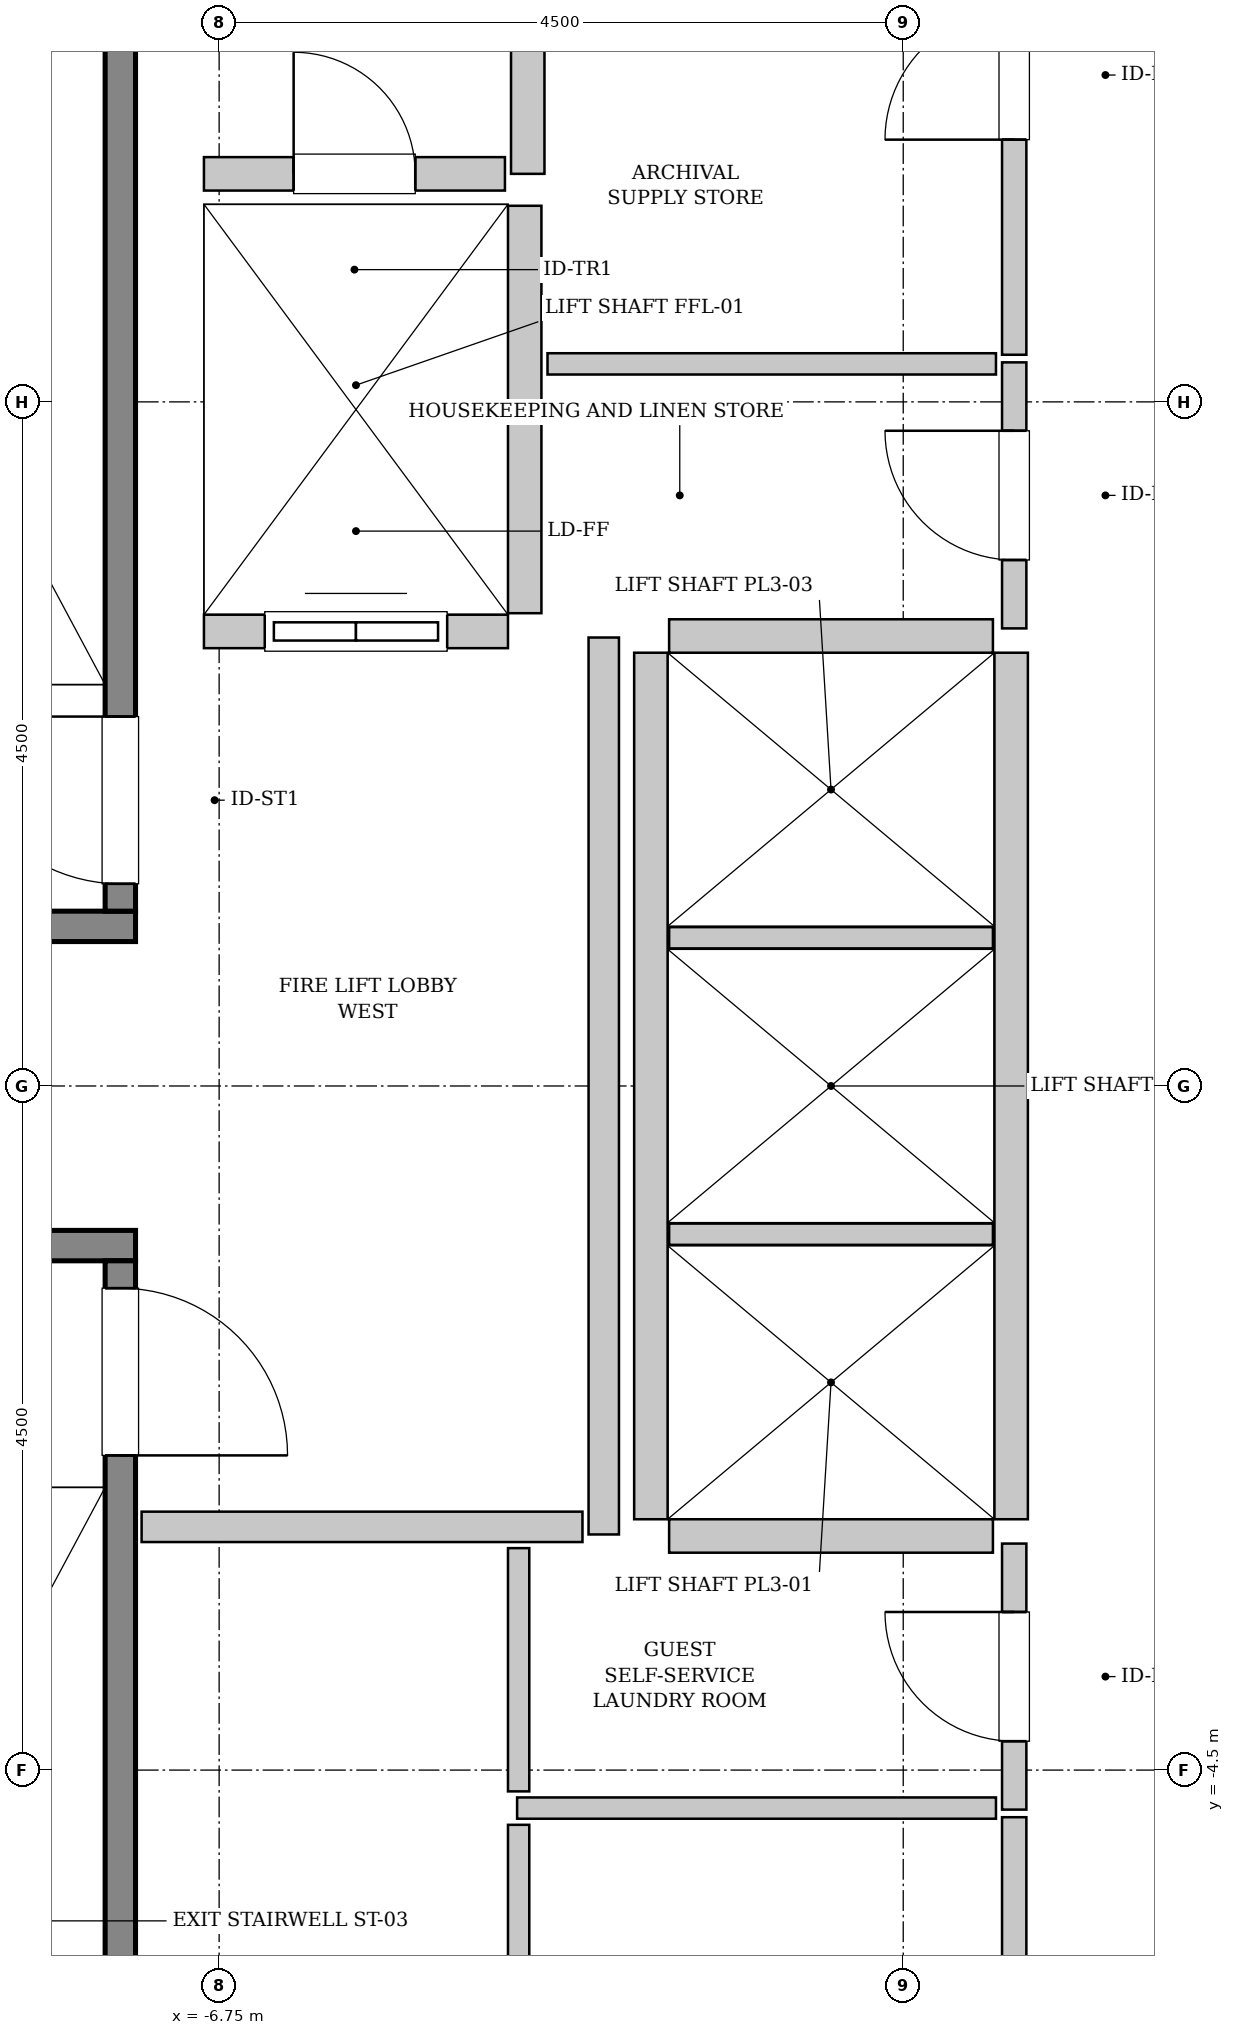
"""IFC4 building model, lengths in metres.
Left out: names, types, materials, properties, quantities, classifications, styles, units other than length and angle.
Written with IfcOpenShell. Run it as: python <this file> out.ifc"""

import sys

from ifc_helpers import new_model, si_unit, direction, frame, frame_2d, origin, place, context, subcontext, project, spatial, rectangle, extrude, source, transform, mapped, element, fill, save


model = new_model("IFC4")
c1 = context("Model", 3, precision=1e-05, world=origin(), true_north=direction((0.0, 1.0)))
c2 = subcontext(c1, "Body", "Model", "MODEL_VIEW")
j1 = project(units=[si_unit("LENGTHUNIT", "METRE"), si_unit("PLANEANGLEUNIT", "RADIAN")], contexts=[c1])
p1 = place(None, origin())
s1 = spatial("IfcSite", under=j1, at=p1, CompositionType="ELEMENT")
p2 = place(p1, origin())
s2 = spatial("IfcBuilding", under=s1, at=p2, CompositionType="ELEMENT")
p3 = place(p2, frame((0.0, 0.0, 349.0)))
s3 = spatial("IfcBuildingStorey", under=s2, at=p3, CompositionType="ELEMENT", Elevation=349.0)
m1 = source(origin(), c2, "Body", "SweptSolid", [
    extrude(rectangle(XDim=3.4, YDim=0.2, at=frame_2d((1.7, 0.0))), origin(), (0.0, 0.0, 1.0), 4.8),
])
p4 = place(p3, frame((-7.3, 1.05, 0.0), z_axis=(0.0, 0.0, 1.0), x_axis=(-1.0, 0.0, 0.0)))
e1 = element("IfcWall", 1, at=p4, inside=s3, PredefinedType="SOLIDWALL", context=c2, shape_type="MappedRepresentation", body=[
    mapped(m1, transform((0.0, 0.0, 0.0), x_axis=(1.0, 0.0, 0.0), y_axis=(0.0, 1.0, 0.0), z_axis=(0.0, 0.0, 1.0), scale=1.0)),
])
m2 = source(origin(), c2, "Body", "SweptSolid", [
    extrude(rectangle(XDim=7.1, YDim=0.2, at=frame_2d((3.55, 0.0))), origin(), (0.0, 0.0, 1.0), 4.8),
])
p5 = place(p3, frame((-7.4, 1.15, 0.0), z_axis=(0.0, 0.0, 1.0), x_axis=(0.0, 1.0, 0.0)))
e2 = element("IfcWall", 2, at=p5, inside=s3, PredefinedType="SOLIDWALL", context=c2, shape_type="MappedRepresentation", body=[
    mapped(m2, transform((0.0, 0.0, 0.0), x_axis=(1.0, 0.0, 0.0), y_axis=(0.0, 1.0, 0.0), z_axis=(0.0, 0.0, 1.0), scale=1.0)),
])
p6 = place(p5, frame((0.18, 0.0, 0.0)))
e3 = element("IfcOpeningElement", 3, at=p6, cuts=e2, PredefinedType="OPENING", context=c2, shape_type="SweptSolid", body=[
    extrude(rectangle(XDim=1.1, YDim=2.15, at=frame_2d((0.55, 1.075))), frame((0.0, 0.11, 0.0), z_axis=(0.0, -1.0, 0.0), x_axis=(1.0, 0.0, 0.0)), (0.0, 0.0, 1.0), 0.22),
])
p7 = place(p3, frame((-10.7, -1.05, 0.0), z_axis=(0.0, 0.0, 1.0), x_axis=(1.0, 0.0, 0.0)))
e4 = element("IfcWall", 4, at=p7, inside=s3, PredefinedType="SOLIDWALL", context=c2, shape_type="MappedRepresentation", body=[
    mapped(m1, transform((0.0, 0.0, 0.0), x_axis=(1.0, 0.0, 0.0), y_axis=(0.0, 1.0, 0.0), z_axis=(0.0, 0.0, 1.0), scale=1.0)),
])
p8 = place(p3, frame((-7.4, -1.15, 0.0), z_axis=(0.0, 0.0, 1.0), x_axis=(0.0, -1.0, 0.0)))
e5 = element("IfcWall", 5, at=p8, inside=s3, PredefinedType="SOLIDWALL", context=c2, shape_type="MappedRepresentation", body=[
    mapped(m2, transform((0.0, 0.0, 0.0), x_axis=(1.0, 0.0, 0.0), y_axis=(0.0, 1.0, 0.0), z_axis=(0.0, 0.0, 1.0), scale=1.0)),
])
p9 = place(p8, frame((0.18, 0.0, 0.0)))
e6 = element("IfcOpeningElement", 6, at=p9, cuts=e5, PredefinedType="OPENING", context=c2, shape_type="SweptSolid", body=[
    extrude(rectangle(XDim=1.1, YDim=2.15, at=frame_2d((0.55, 1.075))), frame((0.0, 0.11, 0.0), z_axis=(0.0, -1.0, 0.0), x_axis=(1.0, 0.0, 0.0)), (0.0, 0.0, 1.0), 0.22),
])
m3 = source(origin(), c2, "Body", "SweptSolid", [
    extrude(rectangle(XDim=2.0, YDim=0.22, at=frame_2d((1.0, 0.0))), origin(), (0.0, 0.0, 1.0), 4.485),
])
p10 = place(p3, frame((-6.85, 2.99, 0.0), z_axis=(0.0, 0.0, 1.0), x_axis=(1.0, 0.0, 0.0)))
e7 = element("IfcWall", 7, at=p10, inside=s3, PredefinedType="SOLIDWALL", context=c2, shape_type="MappedRepresentation", body=[
    mapped(m3, transform((0.0, 0.0, 0.0), x_axis=(1.0, 0.0, 0.0), y_axis=(0.0, 1.0, 0.0), z_axis=(0.0, 0.0, 1.0), scale=1.0)),
])
p11 = place(p10, frame((0.4, 0.0, 0.0)))
e8 = element("IfcOpeningElement", 8, at=p11, cuts=e7, PredefinedType="OPENING", context=c2, shape_type="SweptSolid", body=[
    extrude(rectangle(XDim=1.2, YDim=2.2, at=frame_2d((0.6, 1.1))), frame((0.0, 0.12, 0.0), z_axis=(0.0, -1.0, 0.0), x_axis=(1.0, 0.0, 0.0)), (0.0, 0.0, 1.0), 0.24),
])
m4 = source(origin(), c2, "Body", "SweptSolid", [
    extrude(rectangle(XDim=2.68, YDim=0.22, at=frame_2d((1.34, 0.0))), origin(), (0.0, 0.0, 1.0), 4.485),
])
p12 = place(p3, frame((-4.74, 3.11, 0.0), z_axis=(0.0, 0.0, 1.0), x_axis=(0.0, 1.0, 0.0)))
e9 = element("IfcWall", 9, at=p12, inside=s3, PredefinedType="SOLIDWALL", context=c2, shape_type="MappedRepresentation", body=[
    mapped(m4, transform((0.0, 0.0, 0.0), x_axis=(1.0, 0.0, 0.0), y_axis=(0.0, 1.0, 0.0), z_axis=(0.0, 0.0, 1.0), scale=1.0)),
])
m5 = source(origin(), c2, "Body", "SweptSolid", [
    extrude(rectangle(XDim=5.7, YDim=0.22, at=frame_2d((2.85, 0.0))), origin(), (0.0, 0.0, 1.0), 4.485),
])
for number, where, z_axis, x_axis in (
    (10, (-1.54, -2.85, 0.0), (0.0, 0.0, 1.0), (0.0, 1.0, 0.0)),
    (11, (-3.91, 2.85, 0.0), (0.0, 0.0, 1.0), (0.0, -1.0, 0.0)),
):
    element("IfcWall", number, at=place(p3, frame(where, z_axis=z_axis, x_axis=x_axis)), inside=s3, PredefinedType="SOLIDWALL", context=c2, shape_type="MappedRepresentation", body=[
        mapped(m5, transform((0.0, 0.0, 0.0), x_axis=(1.0, 0.0, 0.0), y_axis=(0.0, 1.0, 0.0), z_axis=(0.0, 0.0, 1.0), scale=1.0)),
    ])
m6 = source(origin(), c2, "Body", "SweptSolid", [
    extrude(rectangle(XDim=2.13, YDim=0.22, at=frame_2d((1.065, 0.0))), origin(), (0.0, 0.0, 1.0), 4.485),
])
p13 = place(p3, frame((-3.79, -2.96, 0.0), z_axis=(0.0, 0.0, 1.0), x_axis=(1.0, 0.0, 0.0)))
e12 = element("IfcWall", 12, at=p13, inside=s3, PredefinedType="SOLIDWALL", context=c2, shape_type="MappedRepresentation", body=[
    mapped(m6, transform((0.0, 0.0, 0.0), x_axis=(1.0, 0.0, 0.0), y_axis=(0.0, 1.0, 0.0), z_axis=(0.0, 0.0, 1.0), scale=1.0)),
])
m7 = source(origin(), c2, "Body", "SweptSolid", [
    extrude(rectangle(XDim=2.13, YDim=0.14, at=frame_2d((1.065, 0.0))), origin(), (0.0, 0.0, 1.0), 4.485),
])
for number, where, z_axis, x_axis in (
    (13, (-3.79, -0.975, 0.0), (0.0, 0.0, 1.0), (1.0, 0.0, 0.0)),
    (14, (-3.79, 0.975, 0.0), (0.0, 0.0, 1.0), (1.0, 0.0, 0.0)),
):
    element("IfcWall", number, at=place(p3, frame(where, z_axis=z_axis, x_axis=x_axis)), inside=s3, PredefinedType="PARTITIONING", context=c2, shape_type="MappedRepresentation", body=[
        mapped(m7, transform((0.0, 0.0, 0.0), x_axis=(1.0, 0.0, 0.0), y_axis=(0.0, 1.0, 0.0), z_axis=(0.0, 0.0, 1.0), scale=1.0)),
    ])
p14 = place(p3, frame((-1.66, 2.96, 0.0), z_axis=(0.0, 0.0, 1.0), x_axis=(-1.0, 0.0, 0.0)))
e15 = element("IfcWall", 15, at=p14, inside=s3, PredefinedType="SOLIDWALL", context=c2, shape_type="MappedRepresentation", body=[
    mapped(m6, transform((0.0, 0.0, 0.0), x_axis=(1.0, 0.0, 0.0), y_axis=(0.0, 1.0, 0.0), z_axis=(0.0, 0.0, 1.0), scale=1.0)),
])
m8 = source(origin(), c2, "Body", "SweptSolid", [
    extrude(rectangle(XDim=2.25, YDim=0.22, at=frame_2d((1.125, 0.0))), origin(), (0.0, 0.0, 1.0), 4.485),
])
p15 = place(p3, frame((-4.72, 6.0, 0.0), z_axis=(0.0, 0.0, 1.0), x_axis=(0.0, 1.0, 0.0)))
e16 = element("IfcWall", 16, at=p15, inside=s3, PredefinedType="SOLIDWALL", context=c2, shape_type="MappedRepresentation", body=[
    mapped(m8, transform((0.0, 0.0, 0.0), x_axis=(1.0, 0.0, 0.0), y_axis=(0.0, 1.0, 0.0), z_axis=(0.0, 0.0, 1.0), scale=1.0)),
])
m9 = source(origin(), c2, "Body", "SweptSolid", [
    extrude(rectangle(XDim=1.98, YDim=0.22, at=frame_2d((0.99, 0.0))), origin(), (0.0, 0.0, 1.0), 4.485),
])
p16 = place(p3, frame((-6.85, 6.0, 0.0), z_axis=(0.0, 0.0, 1.0), x_axis=(1.0, 0.0, 0.0)))
e17 = element("IfcWall", 17, at=p16, inside=s3, PredefinedType="SOLIDWALL", context=c2, shape_type="MappedRepresentation", body=[
    mapped(m9, transform((0.0, 0.0, 0.0), x_axis=(1.0, 0.0, 0.0), y_axis=(0.0, 1.0, 0.0), z_axis=(0.0, 0.0, 1.0), scale=1.0)),
])
p17 = place(p16, frame((0.59, 0.0, 0.0)))
e18 = element("IfcOpeningElement", 18, at=p17, cuts=e17, PredefinedType="OPENING", context=c2, shape_type="SweptSolid", body=[
    extrude(rectangle(XDim=0.8, YDim=2.0, at=frame_2d((0.4, 1.0))), frame((0.0, 0.12, 0.0), z_axis=(0.0, -1.0, 0.0), x_axis=(1.0, 0.0, 0.0)), (0.0, 0.0, 1.0), 0.24),
])
m10 = source(origin(), c2, "Body", "SweptSolid", [
    extrude(rectangle(XDim=5.9, YDim=0.2, at=frame_2d((2.95, 0.0))), origin(), (0.0, 0.0, 1.0), 4.485),
])
p18 = place(p3, frame((-4.22, -2.95, 0.0), z_axis=(0.0, 0.0, 1.0), x_axis=(0.0, 1.0, 0.0)))
e19 = element("IfcWall", 19, at=p18, inside=s3, PredefinedType="PARTITIONING", context=c2, shape_type="MappedRepresentation", body=[
    mapped(m10, transform((0.0, 0.0, 0.0), x_axis=(1.0, 0.0, 0.0), y_axis=(0.0, 1.0, 0.0), z_axis=(0.0, 0.0, 1.0), scale=1.0)),
])
m11 = source(origin(), c2, "Body", "SweptSolid", [
    extrude(rectangle(XDim=2.9, YDim=0.2, at=frame_2d((1.45, 0.0))), origin(), (0.0, 0.0, 1.0), 4.485),
])
p19 = place(p3, frame((-7.26, -2.9, 0.0), z_axis=(0.0, 0.0, 1.0), x_axis=(1.0, 0.0, 0.0)))
e20 = element("IfcWall", 20, at=p19, inside=s3, PredefinedType="PARTITIONING", context=c2, shape_type="MappedRepresentation", body=[
    mapped(m11, transform((0.0, 0.0, 0.0), x_axis=(1.0, 0.0, 0.0), y_axis=(0.0, 1.0, 0.0), z_axis=(0.0, 0.0, 1.0), scale=1.0)),
])
m12 = source(origin(), c2, "Body", "SweptSolid", [
    extrude(rectangle(XDim=1.75, YDim=0.16, at=frame_2d((0.875, 0.0))), origin(), (0.0, 0.0, 1.0), 4.485),
])
p20 = place(p3, frame((-1.52, 3.01, 0.0), z_axis=(0.0, 0.0, 1.0), x_axis=(0.0, 1.0, 0.0)))
e21 = element("IfcWall", 21, at=p20, inside=s3, PredefinedType="PARTITIONING", context=c2, shape_type="MappedRepresentation", body=[
    mapped(m12, transform((0.0, 0.0, 0.0), x_axis=(1.0, 0.0, 0.0), y_axis=(0.0, 1.0, 0.0), z_axis=(0.0, 0.0, 1.0), scale=1.0)),
])
p21 = place(p20, frame((0.45, 0.0, 0.0)))
e22 = element("IfcOpeningElement", 22, at=p21, cuts=e21, PredefinedType="OPENING", context=c2, shape_type="SweptSolid", body=[
    extrude(rectangle(XDim=0.85, YDim=2.1, at=frame_2d((0.425, 1.05))), frame((0.0, 0.09, 0.0), z_axis=(0.0, -1.0, 0.0), x_axis=(1.0, 0.0, 0.0)), (0.0, 0.0, 1.0), 0.18),
])
m13 = source(origin(), c2, "Body", "SweptSolid", [
    extrude(rectangle(XDim=2.95, YDim=0.14, at=frame_2d((1.475, 0.0))), origin(), (0.0, 0.0, 1.0), 4.485),
])
p22 = place(p3, frame((-4.59, 4.75, 0.0), z_axis=(0.0, 0.0, 1.0), x_axis=(1.0, 0.0, 0.0)))
e23 = element("IfcWall", 23, at=p22, inside=s3, PredefinedType="PARTITIONING", context=c2, shape_type="MappedRepresentation", body=[
    mapped(m13, transform((0.0, 0.0, 0.0), x_axis=(1.0, 0.0, 0.0), y_axis=(0.0, 1.0, 0.0), z_axis=(0.0, 0.0, 1.0), scale=1.0)),
])
m14 = source(origin(), c2, "Body", "SweptSolid", [
    extrude(rectangle(XDim=3.68, YDim=0.16, at=frame_2d((1.84, 0.0))), origin(), (0.0, 0.0, 1.0), 4.485),
])
p23 = place(p3, frame((-1.52, 4.81, 0.0), z_axis=(0.0, 0.0, 1.0), x_axis=(0.0, 1.0, 0.0)))
e24 = element("IfcWall", 24, at=p23, inside=s3, PredefinedType="PARTITIONING", context=c2, shape_type="MappedRepresentation", body=[
    mapped(m14, transform((0.0, 0.0, 0.0), x_axis=(1.0, 0.0, 0.0), y_axis=(0.0, 1.0, 0.0), z_axis=(0.0, 0.0, 1.0), scale=1.0)),
])
p24 = place(p23, frame((1.415, 0.0, 0.0)))
e25 = element("IfcOpeningElement", 25, at=p24, cuts=e24, PredefinedType="OPENING", context=c2, shape_type="SweptSolid", body=[
    extrude(rectangle(XDim=0.85, YDim=2.1, at=frame_2d((0.425, 1.05))), frame((0.0, 0.09, 0.0), z_axis=(0.0, -1.0, 0.0), x_axis=(1.0, 0.0, 0.0)), (0.0, 0.0, 1.0), 0.18),
])
p25 = place(p3, frame((-1.52, -4.76, 0.0), z_axis=(0.0, 0.0, 1.0), x_axis=(0.0, 1.0, 0.0)))
e26 = element("IfcWall", 26, at=p25, inside=s3, PredefinedType="PARTITIONING", context=c2, shape_type="MappedRepresentation", body=[
    mapped(m12, transform((0.0, 0.0, 0.0), x_axis=(1.0, 0.0, 0.0), y_axis=(0.0, 1.0, 0.0), z_axis=(0.0, 0.0, 1.0), scale=1.0)),
])
p26 = place(p25, frame((0.45, 0.0, 0.0)))
e27 = element("IfcOpeningElement", 27, at=p26, cuts=e26, PredefinedType="OPENING", context=c2, shape_type="SweptSolid", body=[
    extrude(rectangle(XDim=0.85, YDim=2.1, at=frame_2d((0.425, 1.05))), frame((0.0, 0.09, 0.0), z_axis=(0.0, -1.0, 0.0), x_axis=(1.0, 0.0, 0.0)), (0.0, 0.0, 1.0), 0.18),
])
m15 = source(origin(), c2, "Body", "SweptSolid", [
    extrude(rectangle(XDim=3.15, YDim=0.14, at=frame_2d((1.575, 0.0))), origin(), (0.0, 0.0, 1.0), 4.485),
])
p27 = place(p3, frame((-4.79, -4.75, 0.0), z_axis=(0.0, 0.0, 1.0), x_axis=(1.0, 0.0, 0.0)))
e28 = element("IfcWall", 28, at=p27, inside=s3, PredefinedType="PARTITIONING", context=c2, shape_type="MappedRepresentation", body=[
    mapped(m15, transform((0.0, 0.0, 0.0), x_axis=(1.0, 0.0, 0.0), y_axis=(0.0, 1.0, 0.0), z_axis=(0.0, 0.0, 1.0), scale=1.0)),
])
m16 = source(origin(), c2, "Body", "SweptSolid", [
    extrude(rectangle(XDim=1.6, YDim=0.14, at=frame_2d((0.8, 0.0))), origin(), (0.0, 0.0, 1.0), 4.485),
])
p28 = place(p3, frame((-4.78, -4.64, 0.0), z_axis=(0.0, 0.0, 1.0), x_axis=(0.0, 1.0, 0.0)))
e29 = element("IfcWall", 29, at=p28, inside=s3, PredefinedType="PARTITIONING", context=c2, shape_type="MappedRepresentation", body=[
    mapped(m16, transform((0.0, 0.0, 0.0), x_axis=(1.0, 0.0, 0.0), y_axis=(0.0, 1.0, 0.0), z_axis=(0.0, 0.0, 1.0), scale=1.0)),
])
p29 = place(p3, frame((-1.52, -8.49, 0.0), z_axis=(0.0, 0.0, 1.0), x_axis=(0.0, 1.0, 0.0)))
e30 = element("IfcWall", 30, at=p29, inside=s3, PredefinedType="PARTITIONING", context=c2, shape_type="MappedRepresentation", body=[
    mapped(m14, transform((0.0, 0.0, 0.0), x_axis=(1.0, 0.0, 0.0), y_axis=(0.0, 1.0, 0.0), z_axis=(0.0, 0.0, 1.0), scale=1.0)),
])
p30 = place(p29, frame((1.415, 0.0, 0.0)))
e31 = element("IfcOpeningElement", 31, at=p30, cuts=e30, PredefinedType="OPENING", context=c2, shape_type="SweptSolid", body=[
    extrude(rectangle(XDim=0.85, YDim=2.1, at=frame_2d((0.425, 1.05))), frame((0.0, 0.09, 0.0), z_axis=(0.0, -1.0, 0.0), x_axis=(1.0, 0.0, 0.0)), (0.0, 0.0, 1.0), 0.18),
])
m17 = source(origin(), c2, "Body", "SweptSolid", [
    extrude(rectangle(XDim=3.63, YDim=0.14, at=frame_2d((1.815, 0.0))), origin(), (0.0, 0.0, 1.0), 4.485),
])
p31 = place(p3, frame((-4.78, -8.49, 0.0), z_axis=(0.0, 0.0, 1.0), x_axis=(0.0, 1.0, 0.0)))
e32 = element("IfcWall", 32, at=p31, inside=s3, PredefinedType="PARTITIONING", context=c2, shape_type="MappedRepresentation", body=[
    mapped(m17, transform((0.0, 0.0, 0.0), x_axis=(1.0, 0.0, 0.0), y_axis=(0.0, 1.0, 0.0), z_axis=(0.0, 0.0, 1.0), scale=1.0)),
])
m18 = source(origin(), c2, "Body", "SweptSolid", [
    extrude(rectangle(XDim=1.1, YDim=2.15, at=frame_2d((0.55, 1.075))), frame((0.0, 0.025, 0.0), z_axis=(0.0, -1.0, 0.0), x_axis=(1.0, 0.0, 0.0)), (0.0, 0.0, 1.0), 0.05),
])
p32 = place(p6, origin())
e33 = element("IfcDoor", 33, at=p32, inside=s3, OperationType="SINGLE_SWING_RIGHT", PredefinedType="DOOR", context=c2, shape_type="MappedRepresentation", body=[
    mapped(m18, transform((0.0, 0.0, 0.0), x_axis=(1.0, 0.0, 0.0), y_axis=(0.0, 1.0, 0.0), z_axis=(0.0, 0.0, 1.0), scale=1.0)),
])
fill(e3, e33)
p33 = place(p9, origin())
e34 = element("IfcDoor", 34, at=p33, inside=s3, OperationType="SINGLE_SWING_RIGHT", PredefinedType="DOOR", context=c2, shape_type="MappedRepresentation", body=[
    mapped(m18, transform((0.0, 0.0, 0.0), x_axis=(1.0, 0.0, 0.0), y_axis=(0.0, 1.0, 0.0), z_axis=(0.0, 0.0, 1.0), scale=1.0)),
])
fill(e6, e34)
m19 = source(origin(), c2, "Body", "SweptSolid", [
    extrude(rectangle(XDim=1.2, YDim=2.2, at=frame_2d((0.6, 1.1))), frame((0.0, 0.025, 0.0), z_axis=(0.0, -1.0, 0.0), x_axis=(1.0, 0.0, 0.0)), (0.0, 0.0, 1.0), 0.05),
])
p34 = place(p11, origin())
e35 = element("IfcDoor", 35, at=p34, inside=s3, OperationType="SLIDING_TO_LEFT", PredefinedType="DOOR", context=c2, shape_type="MappedRepresentation", body=[
    mapped(m19, transform((0.0, 0.0, 0.0), x_axis=(1.0, 0.0, 0.0), y_axis=(0.0, 1.0, 0.0), z_axis=(0.0, 0.0, 1.0), scale=1.0)),
])
fill(e8, e35)
m20 = source(origin(), c2, "Body", "SweptSolid", [
    extrude(rectangle(XDim=0.8, YDim=2.0, at=frame_2d((0.4, 1.0))), frame((0.0, 0.025, 0.0), z_axis=(0.0, -1.0, 0.0), x_axis=(1.0, 0.0, 0.0)), (0.0, 0.0, 1.0), 0.05),
])
p35 = place(p17, origin())
e36 = element("IfcDoor", 36, at=p35, inside=s3, OperationType="SINGLE_SWING_LEFT", PredefinedType="TRAPDOOR", context=c2, shape_type="MappedRepresentation", body=[
    mapped(m20, transform((0.0, 0.0, 0.0), x_axis=(1.0, 0.0, 0.0), y_axis=(0.0, 1.0, 0.0), z_axis=(0.0, 0.0, 1.0), scale=1.0)),
])
fill(e18, e36)
m21 = source(origin(), c2, "Body", "SweptSolid", [
    extrude(rectangle(XDim=0.85, YDim=2.1, at=frame_2d((0.425, 1.05))), frame((0.0, 0.025, 0.0), z_axis=(0.0, -1.0, 0.0), x_axis=(1.0, 0.0, 0.0)), (0.0, 0.0, 1.0), 0.05),
])
p36 = place(p21, origin())
e37 = element("IfcDoor", 37, at=p36, inside=s3, OperationType="SINGLE_SWING_RIGHT", PredefinedType="DOOR", context=c2, shape_type="MappedRepresentation", body=[
    mapped(m21, transform((0.0, 0.0, 0.0), x_axis=(1.0, 0.0, 0.0), y_axis=(0.0, 1.0, 0.0), z_axis=(0.0, 0.0, 1.0), scale=1.0)),
])
fill(e22, e37)
p37 = place(p24, origin())
e38 = element("IfcDoor", 38, at=p37, inside=s3, OperationType="SINGLE_SWING_LEFT", PredefinedType="DOOR", context=c2, shape_type="MappedRepresentation", body=[
    mapped(m21, transform((0.0, 0.0, 0.0), x_axis=(1.0, 0.0, 0.0), y_axis=(0.0, 1.0, 0.0), z_axis=(0.0, 0.0, 1.0), scale=1.0)),
])
fill(e25, e38)
p38 = place(p26, origin())
e39 = element("IfcDoor", 39, at=p38, inside=s3, OperationType="SINGLE_SWING_RIGHT", PredefinedType="DOOR", context=c2, shape_type="MappedRepresentation", body=[
    mapped(m21, transform((0.0, 0.0, 0.0), x_axis=(1.0, 0.0, 0.0), y_axis=(0.0, 1.0, 0.0), z_axis=(0.0, 0.0, 1.0), scale=1.0)),
])
fill(e27, e39)
save(model, sys.argv[1])
